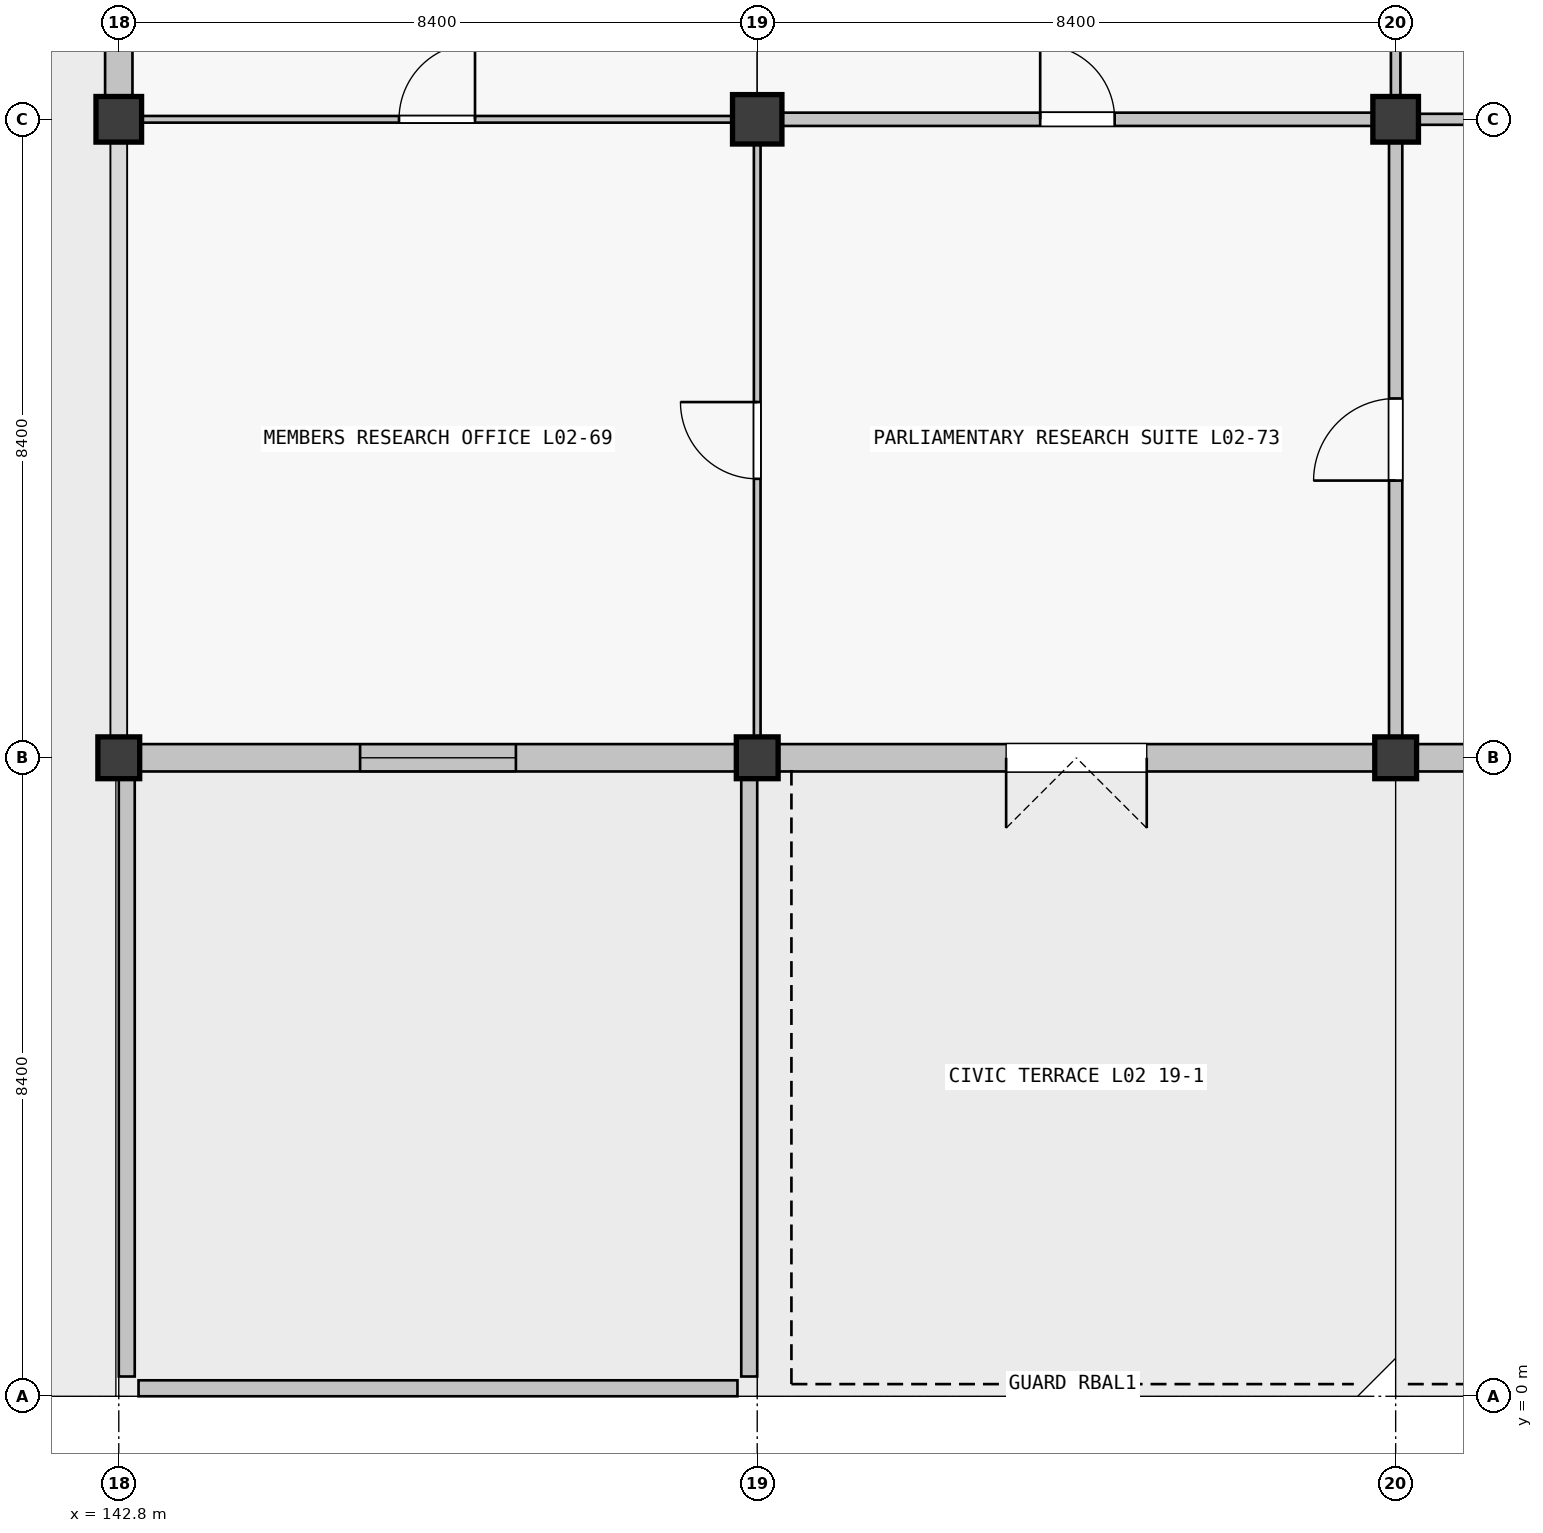
"""IFC4 building model, lengths in metres.
Left out: names, types, materials, properties, quantities, classifications, styles, units other than length and angle.
Written with IfcOpenShell. Run it as: python <this file> out.ifc"""

import sys

from ifc_helpers import new_model, si_unit, direction, frame, frame_2d, origin, origin_2d, place, context, subcontext, project, spatial, rectangle, extrude, element, fill, save


model = new_model("IFC4")
c1 = context("Model", 3, precision=1e-05, world=origin(), true_north=direction((0.0, 1.0)))
c2 = subcontext(c1, "Body", "Model", "MODEL_VIEW")
j1 = project(units=[si_unit("LENGTHUNIT", "METRE"), si_unit("PLANEANGLEUNIT", "RADIAN")], contexts=[c1])
p1 = place(None, origin())
s1 = spatial("IfcSite", under=j1, at=p1, CompositionType="ELEMENT")
p2 = place(p1, origin())
s2 = spatial("IfcBuilding", under=s1, at=p2, CompositionType="ELEMENT")
p3 = place(p2, frame((0.0, 0.0, 10.26)))
s3 = spatial("IfcBuildingStorey", under=s2, at=p3, CompositionType="ELEMENT", Elevation=10.26)
p4 = place(p3, frame((142.8, 8.4, 0.0), z_axis=(0.0, 0.0, 1.0), x_axis=(1.0, 0.0, 0.0)))
e1 = element("IfcColumn", 1, at=p4, inside=s3, PredefinedType="COLUMN", context=c2, shape_type="SweptSolid", body=[
    extrude(rectangle(XDim=0.55, YDim=0.55, at=origin_2d()), origin(), (0.0, 0.0, 1.0), 4.25),
])
p5 = place(p3, frame((142.8, 16.8, 0.0), z_axis=(0.0, 0.0, 1.0), x_axis=(1.0, 0.0, 0.0)))
e2 = element("IfcColumn", 2, at=p5, inside=s3, PredefinedType="COLUMN", context=c2, shape_type="SweptSolid", body=[
    extrude(rectangle(XDim=0.6, YDim=0.6, at=origin_2d()), origin(), (0.0, 0.0, 1.0), 4.5),
])
p6 = place(p3, frame((151.2, 8.4, 0.0), z_axis=(0.0, 0.0, 1.0), x_axis=(1.0, 0.0, 0.0)))
e3 = element("IfcColumn", 3, at=p6, inside=s3, PredefinedType="COLUMN", context=c2, shape_type="SweptSolid", body=[
    extrude(rectangle(XDim=0.55, YDim=0.55, at=origin_2d()), origin(), (0.0, 0.0, 1.0), 4.25),
])
p7 = place(p3, frame((151.2, 16.8, 0.0), z_axis=(0.0, 0.0, 1.0), x_axis=(1.0, 0.0, 0.0)))
e4 = element("IfcColumn", 4, at=p7, inside=s3, PredefinedType="COLUMN", context=c2, shape_type="SweptSolid", body=[
    extrude(rectangle(XDim=0.65, YDim=0.65, at=origin_2d()), origin(), (0.0, 0.0, 1.0), 4.5),
])
p8 = place(p3, frame((159.6, 8.4, 0.0), z_axis=(0.0, 0.0, 1.0), x_axis=(1.0, 0.0, 0.0)))
e5 = element("IfcColumn", 5, at=p8, inside=s3, PredefinedType="COLUMN", context=c2, shape_type="SweptSolid", body=[
    extrude(rectangle(XDim=0.55, YDim=0.55, at=origin_2d()), origin(), (0.0, 0.0, 1.0), 4.25),
])
p9 = place(p3, frame((159.6, 16.8, 0.0), z_axis=(0.0, 0.0, 1.0), x_axis=(1.0, 0.0, 0.0)))
e6 = element("IfcColumn", 6, at=p9, inside=s3, PredefinedType="COLUMN", context=c2, shape_type="SweptSolid", body=[
    extrude(rectangle(XDim=0.6, YDim=0.6, at=origin_2d()), origin(), (0.0, 0.0, 1.0), 4.5),
])
p10 = place(p3, frame((150.924, 8.4, 0.0), z_axis=(0.0, 0.0, 1.0), x_axis=(-1.0, 0.0, 0.0)))
e7 = element("IfcWall", 7, at=p10, inside=s3, PredefinedType="SOLIDWALL", context=c2, shape_type="SweptSolid", body=[
    extrude(rectangle(XDim=7.848, YDim=0.36, at=frame_2d((3.924, 0.0))), origin(), (0.0, 0.0, 1.0), 3.54),
])
p11 = place(p10, frame((2.899, 0.0, 0.9)))
e8 = element("IfcOpeningElement", 8, at=p11, cuts=e7, PredefinedType="OPENING", context=c2, shape_type="SweptSolid", body=[
    extrude(rectangle(XDim=2.05, YDim=1.45, at=frame_2d((1.025, 0.725))), frame((0.0, 0.18, 0.0), z_axis=(0.0, -1.0, 0.0), x_axis=(1.0, 0.0, 0.0)), (0.0, 0.0, 1.0), 0.36),
])
p12 = place(p3, frame((142.8, 17.101, 0.0), z_axis=(0.0, 0.0, 1.0), x_axis=(0.0, 1.0, 0.0)))
e9 = element("IfcWall", 9, at=p12, inside=s3, PredefinedType="SOLIDWALL", context=c2, shape_type="SweptSolid", body=[
    extrude(rectangle(XDim=7.773, YDim=0.36, at=frame_2d((3.886, 0.0))), origin(), (0.0, 0.0, 1.0), 3.54),
])
p13 = place(p12, frame((2.661, 0.0, 0.9)))
e10 = element("IfcOpeningElement", 10, at=p13, cuts=e9, PredefinedType="OPENING", context=c2, shape_type="SweptSolid", body=[
    extrude(rectangle(XDim=2.45, YDim=1.45, at=frame_2d((1.225, 0.725))), frame((0.0, 0.18, 0.0), z_axis=(0.0, -1.0, 0.0), x_axis=(1.0, 0.0, 0.0)), (0.0, 0.0, 1.0), 0.36),
])
p14 = place(p3, frame((159.324, 8.4, 0.0), z_axis=(0.0, 0.0, 1.0), x_axis=(-1.0, 0.0, 0.0)))
e11 = element("IfcWall", 11, at=p14, inside=s3, PredefinedType="SOLIDWALL", context=c2, shape_type="SweptSolid", body=[
    extrude(rectangle(XDim=7.848, YDim=0.36, at=frame_2d((3.924, 0.0))), origin(), (0.0, 0.0, 1.0), 3.54),
])
p15 = place(p14, frame((2.999, 0.0, 0.0)))
e12 = element("IfcOpeningElement", 12, at=p15, cuts=e11, PredefinedType="OPENING", context=c2, shape_type="SweptSolid", body=[
    extrude(rectangle(XDim=1.85, YDim=2.2, at=frame_2d((0.925, 1.1))), frame((0.0, 0.18, 0.0), z_axis=(0.0, -1.0, 0.0), x_axis=(1.0, 0.0, 0.0)), (0.0, 0.0, 1.0), 0.36),
])
p16 = place(p3, frame((167.724, 8.4, 0.0), z_axis=(0.0, 0.0, 1.0), x_axis=(-1.0, 0.0, 0.0)))
e13 = element("IfcWall", 13, at=p16, inside=s3, PredefinedType="SOLIDWALL", context=c2, shape_type="SweptSolid", body=[
    extrude(rectangle(XDim=7.848, YDim=0.36, at=frame_2d((3.924, 0.0))), origin(), (0.0, 0.0, 1.0), 3.54),
])
p17 = place(p16, frame((3.364, 0.0, 0.0)))
e14 = element("IfcOpeningElement", 14, at=p17, cuts=e13, PredefinedType="OPENING", context=c2, shape_type="SweptSolid", body=[
    extrude(rectangle(XDim=1.12, YDim=2.2, at=frame_2d((0.56, 1.1))), frame((0.0, 0.18, 0.0), z_axis=(0.0, -1.0, 0.0), x_axis=(1.0, 0.0, 0.0)), (0.0, 0.0, 1.0), 0.36),
])
for number, where, z_axis, x_axis in (
    (15, (150.94, 0.105, 0.0), (0.0, 0.0, 1.0), (-1.0, 0.0, 0.0)),
    (16, (142.905, 0.26, 0.0), (0.0, 0.0, 1.0), (0.0, 1.0, 0.0)),
    (17, (151.095, 8.14, 0.0), (0.0, 0.0, 1.0), (0.0, -1.0, 0.0)),
):
    element("IfcWall", number, at=place(p3, frame(where, z_axis=z_axis, x_axis=x_axis)), inside=s3, PredefinedType="PARAPET", context=c2, shape_type="SweptSolid", body=[
        extrude(rectangle(XDim=7.88, YDim=0.21, at=frame_2d((3.94, 0.0))), origin(), (0.0, 0.0, 1.0), 0.95),
    ])
p18 = place(p3, frame((143.102, 16.8, 0.0), z_axis=(0.0, 0.0, 1.0), x_axis=(1.0, 0.0, 0.0)))
e18 = element("IfcWall", 18, at=p18, inside=s3, PredefinedType="PARTITIONING", context=c2, shape_type="SweptSolid", body=[
    extrude(rectangle(XDim=7.771, YDim=0.088, at=frame_2d((3.885, 0.0))), origin(), (0.0, 0.0, 1.0), 3.37),
])
p19 = place(p18, frame((3.385, 0.0, 0.0)))
e19 = element("IfcOpeningElement", 19, at=p19, cuts=e18, PredefinedType="OPENING", context=c2, shape_type="SweptSolid", body=[
    extrude(rectangle(XDim=1.0, YDim=2.2, at=frame_2d((0.5, 1.1))), frame((0.0, 0.044, 0.0), z_axis=(0.0, -1.0, 0.0), x_axis=(1.0, 0.0, 0.0)), (0.0, 0.0, 1.0), 0.088),
])
p20 = place(p3, frame((151.527, 16.8, 0.0), z_axis=(0.0, 0.0, 1.0), x_axis=(1.0, 0.0, 0.0)))
e20 = element("IfcWall", 20, at=p20, inside=s3, PredefinedType="PARTITIONING", context=c2, shape_type="SweptSolid", body=[
    extrude(rectangle(XDim=7.771, YDim=0.175, at=frame_2d((3.885, 0.0))), origin(), (0.0, 0.0, 1.0), 3.37),
])
p21 = place(p20, frame((3.396, 0.0, 0.0)))
e21 = element("IfcOpeningElement", 21, at=p21, cuts=e20, PredefinedType="OPENING", context=c2, shape_type="SweptSolid", body=[
    extrude(rectangle(XDim=0.98, YDim=2.18, at=frame_2d((0.49, 1.09))), frame((0.0, 0.087, 0.0), z_axis=(0.0, -1.0, 0.0), x_axis=(1.0, 0.0, 0.0)), (0.0, 0.0, 1.0), 0.175),
])
p22 = place(p3, frame((159.902, 16.8, 0.0), z_axis=(0.0, 0.0, 1.0), x_axis=(1.0, 0.0, 0.0)))
e22 = element("IfcWall", 22, at=p22, inside=s3, PredefinedType="PARTITIONING", context=c2, shape_type="SweptSolid", body=[
    extrude(rectangle(XDim=7.771, YDim=0.145, at=frame_2d((3.885, 0.0))), origin(), (0.0, 0.0, 1.0), 3.37),
])
p23 = place(p22, frame((3.425, 0.0, 0.0)))
e23 = element("IfcOpeningElement", 23, at=p23, cuts=e22, PredefinedType="OPENING", context=c2, shape_type="SweptSolid", body=[
    extrude(rectangle(XDim=0.92, YDim=2.15, at=frame_2d((0.46, 1.075))), frame((0.0, 0.073, 0.0), z_axis=(0.0, -1.0, 0.0), x_axis=(1.0, 0.0, 0.0)), (0.0, 0.0, 1.0), 0.145),
])
p24 = place(p3, frame((151.2, 8.677, 0.0), z_axis=(0.0, 0.0, 1.0), x_axis=(0.0, 1.0, 0.0)))
e24 = element("IfcWall", 24, at=p24, inside=s3, PredefinedType="PARTITIONING", context=c2, shape_type="SweptSolid", body=[
    extrude(rectangle(XDim=7.796, YDim=0.088, at=frame_2d((3.898, 0.0))), origin(), (0.0, 0.0, 1.0), 3.37),
])
p25 = place(p24, frame((3.393, 0.0, 0.0)))
e25 = element("IfcOpeningElement", 25, at=p25, cuts=e24, PredefinedType="OPENING", context=c2, shape_type="SweptSolid", body=[
    extrude(rectangle(XDim=1.01, YDim=2.12, at=frame_2d((0.505, 1.06))), frame((0.0, 0.044, 0.0), z_axis=(0.0, -1.0, 0.0), x_axis=(1.0, 0.0, 0.0)), (0.0, 0.0, 1.0), 0.088),
])
p26 = place(p3, frame((159.6, 8.677, 0.0), z_axis=(0.0, 0.0, 1.0), x_axis=(0.0, 1.0, 0.0)))
e26 = element("IfcWall", 26, at=p26, inside=s3, PredefinedType="PARTITIONING", context=c2, shape_type="SweptSolid", body=[
    extrude(rectangle(XDim=7.821, YDim=0.175, at=frame_2d((3.911, 0.0))), origin(), (0.0, 0.0, 1.0), 3.37),
])
p27 = place(p26, frame((3.37, 0.0, 0.0)))
e27 = element("IfcOpeningElement", 27, at=p27, cuts=e26, PredefinedType="OPENING", context=c2, shape_type="SweptSolid", body=[
    extrude(rectangle(XDim=1.08, YDim=2.25, at=frame_2d((0.54, 1.125))), frame((0.0, 0.087, 0.0), z_axis=(0.0, -1.0, 0.0), x_axis=(1.0, 0.0, 0.0)), (0.0, 0.0, 1.0), 0.175),
])
p28 = place(p3, frame((159.6, 17.102, 0.0), z_axis=(0.0, 0.0, 1.0), x_axis=(0.0, 1.0, 0.0)))
e28 = element("IfcWall", 28, at=p28, inside=s3, PredefinedType="PARTITIONING", context=c2, shape_type="SweptSolid", body=[
    extrude(rectangle(XDim=7.771, YDim=0.125, at=frame_2d((3.885, 0.0))), origin(), (0.0, 0.0, 1.0), 3.37),
])
p29 = place(p28, frame((3.356, 0.0, 0.0)))
e29 = element("IfcOpeningElement", 29, at=p29, cuts=e28, PredefinedType="OPENING", context=c2, shape_type="SweptSolid", body=[
    extrude(rectangle(XDim=1.06, YDim=2.25, at=frame_2d((0.53, 1.125))), frame((0.0, 0.062, 0.0), z_axis=(0.0, -1.0, 0.0), x_axis=(1.0, 0.0, 0.0)), (0.0, 0.0, 1.0), 0.125),
])
p30 = place(p11, origin())
e30 = element("IfcWindow", 30, at=p30, inside=s3, PartitioningType="SINGLE_PANEL", PredefinedType="WINDOW", context=c2, shape_type="SweptSolid", body=[
    extrude(rectangle(XDim=2.05, YDim=1.45, at=frame_2d((1.025, 0.725))), frame((0.0, 0.03, 0.0), z_axis=(0.0, -1.0, 0.0), x_axis=(1.0, 0.0, 0.0)), (0.0, 0.0, 1.0), 0.06),
])
fill(e8, e30)
p31 = place(p15, origin())
e31 = element("IfcDoor", 31, at=p31, inside=s3, OperationType="DOUBLE_DOOR_SINGLE_SWING", PredefinedType="DOOR", context=c2, shape_type="SweptSolid", body=[
    extrude(rectangle(XDim=1.85, YDim=2.2, at=frame_2d((0.925, 1.1))), frame((0.0, 0.025, 0.0), z_axis=(0.0, -1.0, 0.0), x_axis=(1.0, 0.0, 0.0)), (0.0, 0.0, 1.0), 0.05),
])
fill(e12, e31)
p32 = place(p19, origin())
e32 = element("IfcDoor", 32, at=p32, inside=s3, OperationType="SINGLE_SWING_RIGHT", PredefinedType="DOOR", context=c2, shape_type="SweptSolid", body=[
    extrude(rectangle(XDim=1.0, YDim=2.2, at=frame_2d((0.5, 1.1))), frame((0.0, 0.025, 0.0), z_axis=(0.0, -1.0, 0.0), x_axis=(1.0, 0.0, 0.0)), (0.0, 0.0, 1.0), 0.05),
])
fill(e19, e32)
p33 = place(p21, origin())
e33 = element("IfcDoor", 33, at=p33, inside=s3, OperationType="SINGLE_SWING_LEFT", PredefinedType="DOOR", context=c2, shape_type="SweptSolid", body=[
    extrude(rectangle(XDim=0.98, YDim=2.18, at=frame_2d((0.49, 1.09))), frame((0.0, 0.025, 0.0), z_axis=(0.0, -1.0, 0.0), x_axis=(1.0, 0.0, 0.0)), (0.0, 0.0, 1.0), 0.05),
])
fill(e21, e33)
p34 = place(p25, origin())
e34 = element("IfcDoor", 34, at=p34, inside=s3, OperationType="SINGLE_SWING_RIGHT", PredefinedType="DOOR", context=c2, shape_type="SweptSolid", body=[
    extrude(rectangle(XDim=1.01, YDim=2.12, at=frame_2d((0.505, 1.06))), frame((0.0, 0.025, 0.0), z_axis=(0.0, -1.0, 0.0), x_axis=(1.0, 0.0, 0.0)), (0.0, 0.0, 1.0), 0.05),
])
fill(e25, e34)
p35 = place(p27, origin())
e35 = element("IfcDoor", 35, at=p35, inside=s3, OperationType="SINGLE_SWING_LEFT", PredefinedType="DOOR", context=c2, shape_type="SweptSolid", body=[
    extrude(rectangle(XDim=1.08, YDim=2.25, at=frame_2d((0.54, 1.125))), frame((0.0, 0.025, 0.0), z_axis=(0.0, -1.0, 0.0), x_axis=(1.0, 0.0, 0.0)), (0.0, 0.0, 1.0), 0.05),
])
fill(e27, e35)
save(model, sys.argv[1])
